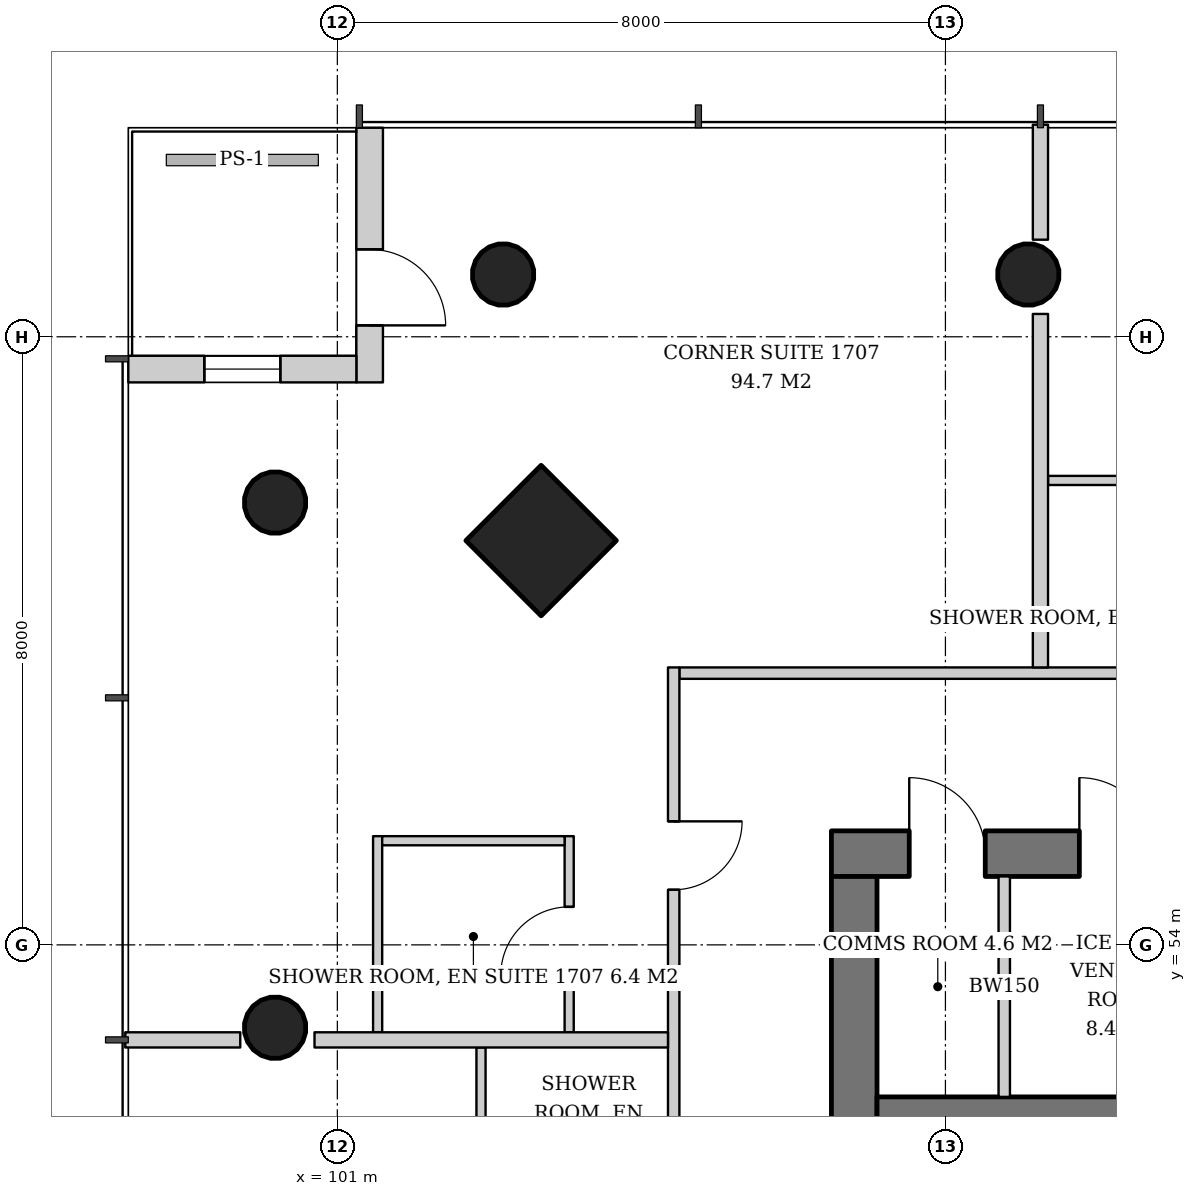
"""IFC4 building model, lengths in metres.
Left out: names, types, materials, properties, quantities, classifications, styles, units other than length and angle.
Written with IfcOpenShell. Run it as: python <this file> out.ifc"""

import sys

from ifc_helpers import new_model, si_unit, direction, frame, frame_2d, origin, origin_2d, place, context, subcontext, project, spatial, rectangle, hollow_circle, extrude, element, fill, save


model = new_model("IFC4")
c1 = context("Model", 3, precision=1e-05, world=origin(), true_north=direction((0.0, 1.0)))
c2 = subcontext(c1, "Body", "Model", "MODEL_VIEW")
j1 = project(units=[si_unit("LENGTHUNIT", "METRE"), si_unit("PLANEANGLEUNIT", "RADIAN")], contexts=[c1])
p1 = place(None, origin())
s1 = spatial("IfcSite", under=j1, at=p1, CompositionType="ELEMENT")
p2 = place(p1, origin())
s2 = spatial("IfcBuilding", under=s1, at=p2, CompositionType="ELEMENT")
p3 = place(p2, frame((0.0, 0.0, 70.4)))
s3 = spatial("IfcBuildingStorey", under=s2, at=p3, CompositionType="ELEMENT", Elevation=70.4)
p4 = place(p3, frame((103.629, 59.371, 0.0), z_axis=(0.043029647111, -0.043029647111, 0.998146732169), x_axis=(0.707106781187, 0.707106781187, 0.0)))
e1 = element("IfcColumn", 1, at=p4, inside=s3, PredefinedType="COLUMN", context=c2, shape_type="SweptSolid", body=[
    extrude(rectangle(XDim=1.4, YDim=1.4, at=origin_2d()), origin(), (0.0, 0.0, 1.0), 3.807),
])
p5 = place(p3, frame((103.129, 62.871, 0.0), z_axis=(0.043029647111, -0.043029647111, 0.998146732169), x_axis=(0.707106781187, 0.707106781187, 0.0)))
e2 = element("IfcColumn", 2, at=p5, inside=s3, PredefinedType="COLUMN", context=c2, shape_type="SweptSolid", body=[
    extrude(hollow_circle(Radius=0.406, WallThickness=0.03, at=origin_2d()), origin(), (0.0, 0.0, 1.0), 3.807),
])
p6 = place(p3, frame((110.065, 62.871, 0.0), z_axis=(0.021497706284, -0.043059584825, 0.998841188968), x_axis=(0.894693706707, 0.446680166538, 0.0)))
e3 = element("IfcColumn", 3, at=p6, inside=s3, PredefinedType="COLUMN", context=c2, shape_type="SweptSolid", body=[
    extrude(hollow_circle(Radius=0.406, WallThickness=0.03, at=origin_2d()), origin(), (0.0, 0.0, 1.0), 3.804),
])
p7 = place(p3, frame((100.129, 59.871, 0.0), z_axis=(0.043029647111, -0.043029647111, 0.998146732169), x_axis=(0.707106781187, 0.707106781187, 0.0)))
e4 = element("IfcColumn", 4, at=p7, inside=s3, PredefinedType="COLUMN", context=c2, shape_type="SweptSolid", body=[
    extrude(hollow_circle(Radius=0.406, WallThickness=0.03, at=origin_2d()), origin(), (0.0, 0.0, 1.0), 3.807),
])
p8 = place(p3, frame((100.129, 52.935, 0.0), z_axis=(0.043059584825, -0.021497706284, 0.998841188968), x_axis=(0.446680166538, 0.894693706707, 0.0)))
e5 = element("IfcColumn", 5, at=p8, inside=s3, PredefinedType="COLUMN", context=c2, shape_type="SweptSolid", body=[
    extrude(hollow_circle(Radius=0.406, WallThickness=0.03, at=origin_2d()), origin(), (0.0, 0.0, 1.0), 3.804),
])
p9 = place(p3, frame((107.5, 55.2, 0.0), z_axis=(0.0, 0.0, 1.0), x_axis=(1.0, 0.0, 0.0)))
e6 = element("IfcWall", 6, at=p9, inside=s3, PredefinedType="SHEAR", context=c2, shape_type="SweptSolid", body=[
    extrude(rectangle(XDim=19.0, YDim=0.6, at=frame_2d((9.5, 0.0))), origin(), (0.0, 0.0, 1.0), 3.8),
])
p10 = place(p9, frame((14.14, 0.0, 0.0)))
e7 = element("IfcOpeningElement", 7, at=p10, cuts=e6, PredefinedType="OPENING", context=c2, shape_type="SweptSolid", body=[
    extrude(rectangle(XDim=1.0, YDim=2.1, at=frame_2d((0.5, 1.05))), frame((0.0, 0.31, 0.0), z_axis=(0.0, -1.0, 0.0), x_axis=(1.0, 0.0, 0.0)), (0.0, 0.0, 1.0), 0.62),
])
p11 = place(p9, frame((1.024, 0.0, 0.0)))
e8 = element("IfcOpeningElement", 8, at=p11, cuts=e6, PredefinedType="OPENING", context=c2, shape_type="SweptSolid", body=[
    extrude(rectangle(XDim=1.0, YDim=2.1, at=frame_2d((0.5, 1.05))), frame((0.0, 0.31, 0.0), z_axis=(0.0, -1.0, 0.0), x_axis=(1.0, 0.0, 0.0)), (0.0, 0.0, 1.0), 0.62),
])
p12 = place(p9, frame((3.262, 0.0, 0.0)))
e9 = element("IfcOpeningElement", 9, at=p12, cuts=e6, PredefinedType="OPENING", context=c2, shape_type="SweptSolid", body=[
    extrude(rectangle(XDim=1.0, YDim=2.1, at=frame_2d((0.5, 1.05))), frame((0.0, 0.31, 0.0), z_axis=(0.0, -1.0, 0.0), x_axis=(1.0, 0.0, 0.0)), (0.0, 0.0, 1.0), 0.62),
])
p13 = place(p3, frame((107.8, 37.1, 0.0), z_axis=(0.0, 0.0, 1.0), x_axis=(0.0, 1.0, 0.0)))
e10 = element("IfcWall", 10, at=p13, inside=s3, PredefinedType="SHEAR", context=c2, shape_type="SweptSolid", body=[
    extrude(rectangle(XDim=17.8, YDim=0.6, at=frame_2d((8.9, 0.0))), origin(), (0.0, 0.0, 1.0), 3.8),
])
p14 = place(p13, frame((8.0, 0.0, 0.0)))
e11 = element("IfcOpeningElement", 11, at=p14, cuts=e10, PredefinedType="OPENING", context=c2, shape_type="SweptSolid", body=[
    extrude(rectangle(XDim=1.8, YDim=2.4, at=frame_2d((0.9, 1.2))), frame((0.0, 0.31, 0.0), z_axis=(0.0, -1.0, 0.0), x_axis=(1.0, 0.0, 0.0)), (0.0, 0.0, 1.0), 0.62),
])
p15 = place(p3, frame((108.1, 51.8, 0.0), z_axis=(0.0, 0.0, 1.0), x_axis=(1.0, 0.0, 0.0)))
e12 = element("IfcWall", 12, at=p15, inside=s3, PredefinedType="SHEAR", context=c2, shape_type="SweptSolid", body=[
    extrude(rectangle(XDim=17.8, YDim=0.4, at=frame_2d((8.9, 0.0))), origin(), (0.0, 0.0, 1.0), 3.8),
])
p16 = place(p3, frame((101.425, 64.75, 0.0), z_axis=(0.0, 0.0, 1.0), x_axis=(0.0, -1.0, 0.0)))
e13 = element("IfcWall", 13, at=p16, inside=s3, PredefinedType="SOLIDWALL", context=c2, shape_type="SweptSolid", body=[
    extrude(rectangle(XDim=3.35, YDim=0.35, at=frame_2d((1.675, 0.0))), origin(), (0.0, 0.0, 1.0), 3.6),
])
p17 = place(p16, frame((1.6, 0.0, 0.0)))
e14 = element("IfcOpeningElement", 14, at=p17, cuts=e13, PredefinedType="OPENING", context=c2, shape_type="SweptSolid", body=[
    extrude(rectangle(XDim=1.0, YDim=2.4, at=frame_2d((0.5, 1.2))), frame((0.0, 0.185, 0.0), z_axis=(0.0, -1.0, 0.0), x_axis=(1.0, 0.0, 0.0)), (0.0, 0.0, 1.0), 0.37),
])
p18 = place(p3, frame((101.25, 61.575, 0.0), z_axis=(0.0, 0.0, 1.0), x_axis=(-1.0, 0.0, 0.0)))
e15 = element("IfcWall", 15, at=p18, inside=s3, PredefinedType="SOLIDWALL", context=c2, shape_type="SweptSolid", body=[
    extrude(rectangle(XDim=3.0, YDim=0.35, at=frame_2d((1.5, 0.0))), origin(), (0.0, 0.0, 1.0), 3.6),
])
p19 = place(p18, frame((1.0, 0.0, 0.9)))
e16 = element("IfcOpeningElement", 16, at=p19, cuts=e15, PredefinedType="OPENING", context=c2, shape_type="SweptSolid", body=[
    extrude(rectangle(XDim=1.0, YDim=2.4, at=frame_2d((0.5, 1.2))), frame((0.0, 0.185, 0.0), z_axis=(0.0, -1.0, 0.0), x_axis=(1.0, 0.0, 0.0)), (0.0, 0.0, 1.0), 0.37),
])
p20 = place(p3, frame((109.774, 52.0, 0.0), z_axis=(0.0, 0.0, 1.0), x_axis=(0.0, 1.0, 0.0)))
e17 = element("IfcWall", 17, at=p20, inside=s3, PredefinedType="SOLIDWALL", context=c2, shape_type="SweptSolid", body=[
    extrude(rectangle(XDim=2.9, YDim=0.15, at=frame_2d((1.45, 0.0))), origin(), (0.0, 0.0, 1.0), 3.6),
])
p21 = place(p3, frame((112.77, 60.11, 0.0), z_axis=(0.0, 0.0, 1.0), x_axis=(-1.0, 0.0, 0.0)))
e18 = element("IfcWall", 18, at=p21, inside=s3, PredefinedType="PARTITIONING", context=c2, shape_type="SweptSolid", body=[
    extrude(rectangle(XDim=2.42, YDim=0.12, at=frame_2d((1.21, 0.0))), origin(), (0.0, 0.0, 1.0), 3.6),
])
p22 = place(p3, frame((128.65, 57.575, 0.0), z_axis=(0.0, 0.0, 1.0), x_axis=(-1.0, 0.0, 0.0)))
e19 = element("IfcWall", 19, at=p22, inside=s3, PredefinedType="PARTITIONING", context=c2, shape_type="SweptSolid", body=[
    extrude(rectangle(XDim=23.15, YDim=0.15, at=frame_2d((11.575, 0.0))), origin(), (0.0, 0.0, 1.0), 2.8),
])
p23 = place(p22, frame((2.025, 0.0, 0.0)))
e20 = element("IfcOpeningElement", 20, at=p23, cuts=e19, PredefinedType="OPENING", context=c2, shape_type="SweptSolid", body=[
    extrude(rectangle(XDim=0.9, YDim=2.1, at=frame_2d((0.45, 1.05))), frame((0.0, 0.085, 0.0), z_axis=(0.0, -1.0, 0.0), x_axis=(1.0, 0.0, 0.0)), (0.0, 0.0, 1.0), 0.17),
])
p24 = place(p22, frame((7.65, 0.0, 0.0)))
e21 = element("IfcOpeningElement", 21, at=p24, cuts=e19, PredefinedType="OPENING", context=c2, shape_type="SweptSolid", body=[
    extrude(rectangle(XDim=0.9, YDim=2.1, at=frame_2d((0.45, 1.05))), frame((0.0, 0.085, 0.0), z_axis=(0.0, -1.0, 0.0), x_axis=(1.0, 0.0, 0.0)), (0.0, 0.0, 1.0), 0.17),
])
p25 = place(p22, frame((14.75, 0.0, 0.0)))
e22 = element("IfcOpeningElement", 22, at=p25, cuts=e19, PredefinedType="OPENING", context=c2, shape_type="SweptSolid", body=[
    extrude(rectangle(XDim=0.9, YDim=2.1, at=frame_2d((0.45, 1.05))), frame((0.0, 0.085, 0.0), z_axis=(0.0, -1.0, 0.0), x_axis=(1.0, 0.0, 0.0)), (0.0, 0.0, 1.0), 0.17),
])
p26 = place(p3, frame((110.25, 57.65, 0.0), z_axis=(0.0, 0.0, 1.0), x_axis=(0.0, 1.0, 0.0)))
e23 = element("IfcWall", 23, at=p26, inside=s3, PredefinedType="PARTITIONING", context=c2, shape_type="SweptSolid", body=[
    extrude(rectangle(XDim=4.65, YDim=0.2, at=frame_2d((2.325, 0.0))), origin(), (0.0, 0.0, 1.0), 3.6),
])
p27 = place(p3, frame((110.25, 63.277, 0.0), z_axis=(0.0, 0.0, 1.0), x_axis=(0.0, 1.0, 0.0)))
e24 = element("IfcWall", 24, at=p27, inside=s3, PredefinedType="PARTITIONING", context=c2, shape_type="SweptSolid", body=[
    extrude(rectangle(XDim=1.513, YDim=0.2, at=frame_2d((0.756, 0.0))), origin(), (0.0, 0.0, 1.0), 3.6),
])
p28 = place(p3, frame((104.05, 52.85, 0.0), z_axis=(0.0, 0.0, 1.0), x_axis=(0.0, 1.0, 0.0)))
e25 = element("IfcWall", 25, at=p28, inside=s3, PredefinedType="PARTITIONING", context=c2, shape_type="SweptSolid", body=[
    extrude(rectangle(XDim=2.58, YDim=0.12, at=frame_2d((1.29, 0.0))), origin(), (0.0, 0.0, 1.0), 2.8),
])
p29 = place(p28, frame((0.75, 0.0, 0.0)))
e26 = element("IfcOpeningElement", 26, at=p29, cuts=e25, PredefinedType="OPENING", context=c2, shape_type="SweptSolid", body=[
    extrude(rectangle(XDim=0.9, YDim=2.1, at=frame_2d((0.45, 1.05))), frame((0.0, 0.07, 0.0), z_axis=(0.0, -1.0, 0.0), x_axis=(1.0, 0.0, 0.0)), (0.0, 0.0, 1.0), 0.14),
])
p30 = place(p3, frame((101.53, 52.85, 0.0), z_axis=(0.0, 0.0, 1.0), x_axis=(0.0, 1.0, 0.0)))
e27 = element("IfcWall", 27, at=p30, inside=s3, PredefinedType="PARTITIONING", context=c2, shape_type="SweptSolid", body=[
    extrude(rectangle(XDim=2.58, YDim=0.12, at=frame_2d((1.29, 0.0))), origin(), (0.0, 0.0, 1.0), 2.8),
])
p31 = place(p3, frame((103.99, 55.37, 0.0), z_axis=(0.0, 0.0, 1.0), x_axis=(-1.0, 0.0, 0.0)))
e28 = element("IfcWall", 28, at=p31, inside=s3, PredefinedType="PARTITIONING", context=c2, shape_type="SweptSolid", body=[
    extrude(rectangle(XDim=2.4, YDim=0.12, at=frame_2d((1.2, 0.0))), origin(), (0.0, 0.0, 1.0), 2.8),
])
p32 = place(p3, frame((102.89, 52.65, 0.0), z_axis=(0.0, 0.0, 1.0), x_axis=(0.0, -1.0, 0.0)))
e29 = element("IfcWall", 29, at=p32, inside=s3, PredefinedType="PARTITIONING", context=c2, shape_type="SweptSolid", body=[
    extrude(rectangle(XDim=2.42, YDim=0.12, at=frame_2d((1.21, 0.0))), origin(), (0.0, 0.0, 1.0), 2.847),
])
p33 = place(p3, frame((105.425, 57.65, 0.0), z_axis=(0.0, 0.0, 1.0), x_axis=(0.0, -1.0, 0.0)))
e30 = element("IfcWall", 30, at=p33, inside=s3, PredefinedType="PARTITIONING", context=c2, shape_type="SweptSolid", body=[
    extrude(rectangle(XDim=23.15, YDim=0.15, at=frame_2d((11.575, 0.0))), origin(), (0.0, 0.0, 1.0), 2.8),
])
p34 = place(p33, frame((2.025, 0.0, 0.0)))
e31 = element("IfcOpeningElement", 31, at=p34, cuts=e30, PredefinedType="OPENING", context=c2, shape_type="SweptSolid", body=[
    extrude(rectangle(XDim=0.9, YDim=2.1, at=frame_2d((0.45, 1.05))), frame((0.0, 0.085, 0.0), z_axis=(0.0, -1.0, 0.0), x_axis=(1.0, 0.0, 0.0)), (0.0, 0.0, 1.0), 0.17),
])
p35 = place(p33, frame((7.65, 0.0, 0.0)))
e32 = element("IfcOpeningElement", 32, at=p35, cuts=e30, PredefinedType="OPENING", context=c2, shape_type="SweptSolid", body=[
    extrude(rectangle(XDim=0.9, YDim=2.1, at=frame_2d((0.45, 1.05))), frame((0.0, 0.085, 0.0), z_axis=(0.0, -1.0, 0.0), x_axis=(1.0, 0.0, 0.0)), (0.0, 0.0, 1.0), 0.17),
])
p36 = place(p33, frame((16.6, 0.0, 0.0)))
e33 = element("IfcOpeningElement", 33, at=p36, cuts=e30, PredefinedType="OPENING", context=c2, shape_type="SweptSolid", body=[
    extrude(rectangle(XDim=1.0, YDim=2.1, at=frame_2d((0.5, 1.05))), frame((0.0, 0.085, 0.0), z_axis=(0.0, -1.0, 0.0), x_axis=(1.0, 0.0, 0.0)), (0.0, 0.0, 1.0), 0.17),
])
p37 = place(p3, frame((105.35, 52.75, 0.0), z_axis=(0.0, 0.0, 1.0), x_axis=(-1.0, 0.0, 0.0)))
e34 = element("IfcWall", 34, at=p37, inside=s3, PredefinedType="PARTITIONING", context=c2, shape_type="SweptSolid", body=[
    extrude(rectangle(XDim=4.65, YDim=0.2, at=frame_2d((2.325, 0.0))), origin(), (0.0, 0.0, 1.0), 3.6),
])
p38 = place(p3, frame((99.723, 52.75, 0.0), z_axis=(0.0, 0.0, 1.0), x_axis=(-1.0, 0.0, 0.0)))
e35 = element("IfcWall", 35, at=p38, inside=s3, PredefinedType="PARTITIONING", context=c2, shape_type="SweptSolid", body=[
    extrude(rectangle(XDim=1.513, YDim=0.2, at=frame_2d((0.756, 0.0))), origin(), (0.0, 0.0, 1.0), 3.6),
])
p39 = place(p17, origin())
e36 = element("IfcDoor", 36, at=p39, inside=s3, OperationType="SINGLE_SWING_RIGHT", PredefinedType="DOOR", context=c2, shape_type="SweptSolid", body=[
    extrude(rectangle(XDim=1.0, YDim=2.4, at=frame_2d((0.5, 1.2))), frame((0.0, 0.025, 0.0), z_axis=(0.0, -1.0, 0.0), x_axis=(1.0, 0.0, 0.0)), (0.0, 0.0, 1.0), 0.05),
])
fill(e14, e36)
p40 = place(p19, origin())
e37 = element("IfcWindow", 37, at=p40, inside=s3, PartitioningType="SINGLE_PANEL", PredefinedType="WINDOW", context=c2, shape_type="SweptSolid", body=[
    extrude(rectangle(XDim=1.0, YDim=2.4, at=frame_2d((0.5, 1.2))), frame((0.0, 0.03, 0.0), z_axis=(0.0, -1.0, 0.0), x_axis=(1.0, 0.0, 0.0)), (0.0, 0.0, 1.0), 0.06),
])
fill(e16, e37)
p41 = place(p11, origin())
e38 = element("IfcDoor", 38, at=p41, inside=s3, OperationType="SINGLE_SWING_LEFT", PredefinedType="DOOR", context=c2, shape_type="SweptSolid", body=[
    extrude(rectangle(XDim=1.0, YDim=2.1, at=frame_2d((0.5, 1.05))), frame((0.0, -0.24, 0.0), z_axis=(0.0, -1.0, 0.0), x_axis=(1.0, 0.0, 0.0)), (0.0, 0.0, 1.0), 0.05),
])
fill(e8, e38)
p42 = place(p12, origin())
e39 = element("IfcDoor", 39, at=p42, inside=s3, OperationType="SINGLE_SWING_LEFT", PredefinedType="DOOR", context=c2, shape_type="SweptSolid", body=[
    extrude(rectangle(XDim=1.0, YDim=2.1, at=frame_2d((0.5, 1.05))), frame((0.0, -0.24, 0.0), z_axis=(0.0, -1.0, 0.0), x_axis=(1.0, 0.0, 0.0)), (0.0, 0.0, 1.0), 0.05),
])
fill(e9, e39)
p43 = place(p29, origin())
e40 = element("IfcDoor", 40, at=p43, inside=s3, OperationType="SINGLE_SWING_LEFT", PredefinedType="DOOR", context=c2, shape_type="SweptSolid", body=[
    extrude(rectangle(XDim=0.9, YDim=2.1, at=frame_2d((0.45, 1.05))), frame((0.0, 0.025, 0.0), z_axis=(0.0, -1.0, 0.0), x_axis=(1.0, 0.0, 0.0)), (0.0, 0.0, 1.0), 0.05),
])
fill(e26, e40)
p44 = place(p34, origin())
e41 = element("IfcDoor", 41, at=p44, inside=s3, OperationType="SINGLE_SWING_LEFT", PredefinedType="DOOR", context=c2, shape_type="SweptSolid", body=[
    extrude(rectangle(XDim=0.9, YDim=2.1, at=frame_2d((0.45, 1.05))), frame((0.0, 0.025, 0.0), z_axis=(0.0, -1.0, 0.0), x_axis=(1.0, 0.0, 0.0)), (0.0, 0.0, 1.0), 0.05),
])
fill(e31, e41)
save(model, sys.argv[1])
